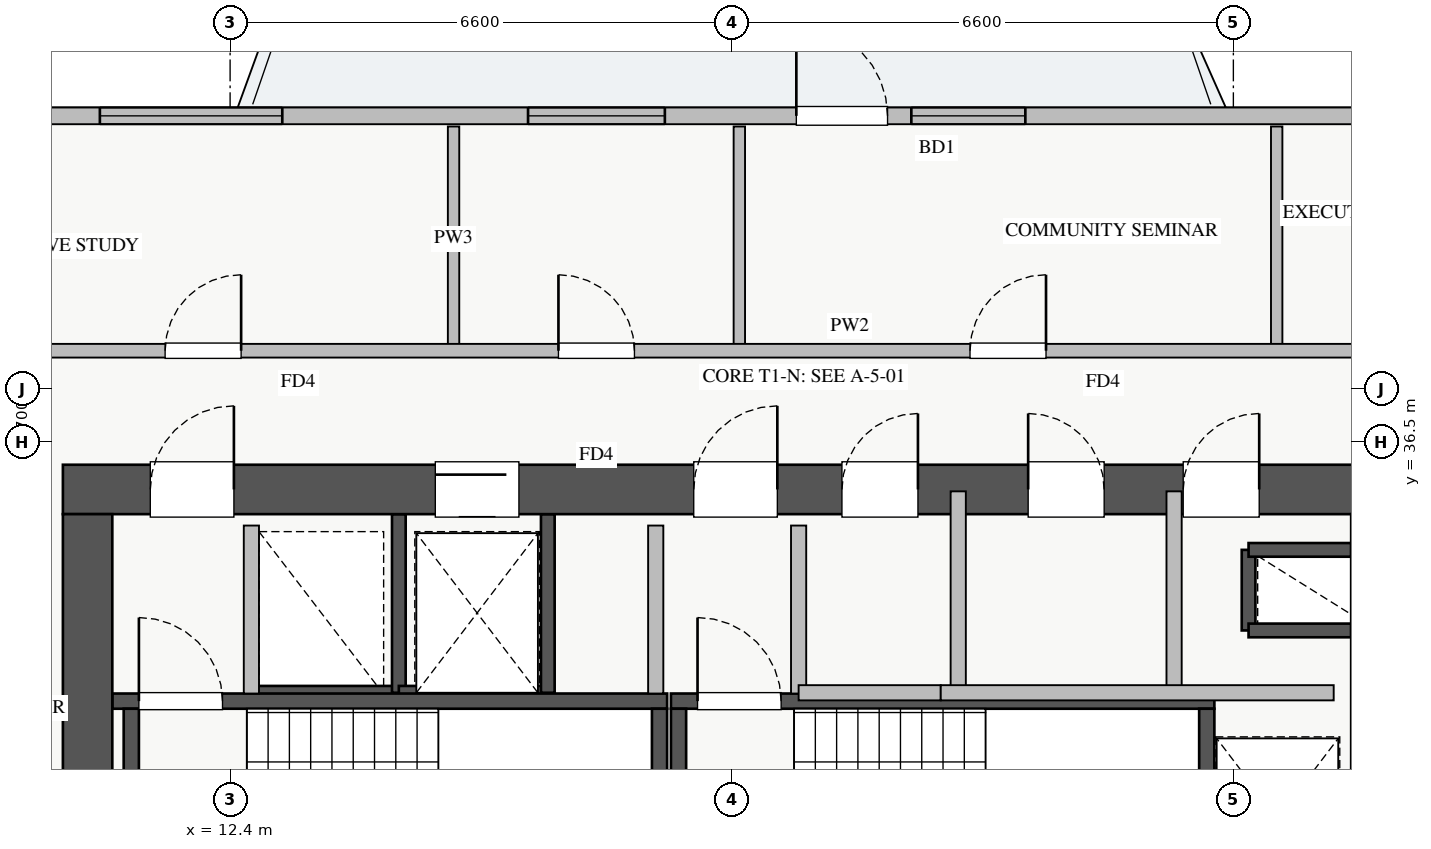
"""IFC4 building model, lengths in metres.
Left out: names, types, materials, properties, quantities, classifications, styles, units other than length and angle.
Written with IfcOpenShell. Run it as: python <this file> out.ifc"""

import sys

from ifc_helpers import new_model, si_unit, direction, frame, frame_2d, origin, place, context, subcontext, project, spatial, rectangle, extrude, source, transform, mapped, element, fill, save


model = new_model("IFC4")
c1 = context("Model", 3, precision=1e-05, world=origin(), true_north=direction((0.0, 1.0)))
c2 = subcontext(c1, "Body", "Model", "MODEL_VIEW")
j1 = project(units=[si_unit("LENGTHUNIT", "METRE"), si_unit("PLANEANGLEUNIT", "RADIAN")], contexts=[c1])
p1 = place(None, origin())
s1 = spatial("IfcSite", under=j1, at=p1, CompositionType="ELEMENT")
p2 = place(p1, origin())
s2 = spatial("IfcBuilding", under=s1, at=p2, CompositionType="ELEMENT")
p3 = place(p2, frame((0.0, 0.0, 150.25)))
s3 = spatial("IfcBuildingStorey", under=s2, at=p3, CompositionType="ELEMENT", Elevation=150.25)
p4 = place(p3, frame((12.68, 33.2, 0.0), z_axis=(0.0, 0.0, 1.0), x_axis=(1.0, 0.0, 0.0)))
e1 = element("IfcWall", 1, at=p4, inside=s3, PredefinedType="SHEAR", context=c2, shape_type="SweptSolid", body=[
    extrude(rectangle(XDim=1.94, YDim=0.18, at=frame_2d((0.97, 0.0))), origin(), (0.0, 0.0, 1.0), 3.07),
])
p5 = place(p3, frame((14.62, 33.2, 0.0), z_axis=(0.0, 0.0, 1.0), x_axis=(0.0, 1.0, 0.0)))
e2 = element("IfcWall", 2, at=p5, inside=s3, PredefinedType="SHEAR", context=c2, shape_type="SweptSolid", body=[
    extrude(rectangle(XDim=2.35, YDim=0.18, at=frame_2d((1.175, 0.0))), origin(), (0.0, 0.0, 1.0), 3.07),
])
p6 = place(p3, frame((25.8, 34.02, 0.0), z_axis=(0.0, 0.0, 1.0), x_axis=(0.0, 1.0, 0.0)))
e3 = element("IfcWall", 3, at=p6, inside=s3, PredefinedType="SHEAR", context=c2, shape_type="SweptSolid", body=[
    extrude(rectangle(XDim=1.06, YDim=0.18, at=frame_2d((0.53, 0.0))), origin(), (0.0, 0.0, 1.0), 3.07),
])
for number, where, z_axis, x_axis in (
    (4, (25.8, 35.08, 0.0), (0.0, 0.0, 1.0), (1.0, 0.0, 0.0)),
    (5, (25.8, 34.02, 0.0), (0.0, 0.0, 1.0), (1.0, 0.0, 0.0)),
):
    element("IfcWall", number, at=place(p3, frame(where, z_axis=z_axis, x_axis=x_axis)), inside=s3, PredefinedType="SHEAR", context=c2, shape_type="SweptSolid", body=[
        extrude(rectangle(XDim=1.35, YDim=0.18, at=frame_2d((0.675, 0.0))), origin(), (0.0, 0.0, 1.0), 3.07),
    ])
p7 = place(p3, frame((14.62, 33.2, 0.0), z_axis=(0.0, 0.0, 1.0), x_axis=(1.0, 0.0, 0.0)))
e6 = element("IfcWall", 6, at=p7, inside=s3, PredefinedType="SHEAR", context=c2, shape_type="SweptSolid", body=[
    extrude(rectangle(XDim=1.96, YDim=0.18, at=frame_2d((0.98, 0.0))), origin(), (0.0, 0.0, 1.0), 3.07),
])
p8 = place(p3, frame((16.58, 33.2, 0.0), z_axis=(0.0, 0.0, 1.0), x_axis=(0.0, 1.0, 0.0)))
e7 = element("IfcWall", 7, at=p8, inside=s3, PredefinedType="SHEAR", context=c2, shape_type="SweptSolid", body=[
    extrude(rectangle(XDim=2.35, YDim=0.18, at=frame_2d((1.175, 0.0))), origin(), (0.0, 0.0, 1.0), 3.07),
])
p9 = place(p3, frame((10.85, 33.09, 0.0), z_axis=(0.0, 0.0, 1.0), x_axis=(1.0, 0.0, 0.0)))
e8 = element("IfcWall", 8, at=p9, inside=s3, PredefinedType="SHEAR", context=c2, shape_type="SweptSolid", body=[
    extrude(rectangle(XDim=7.3, YDim=0.2, at=frame_2d((3.65, 0.0))), origin(), (0.0, 0.0, 1.0), 3.25),
])
p10 = place(p9, frame((0.35, 0.0, 0.0)))
e9 = element("IfcOpeningElement", 9, at=p10, cuts=e8, PredefinedType="OPENING", context=c2, shape_type="SweptSolid", body=[
    extrude(rectangle(XDim=1.1, YDim=2.05, at=frame_2d((0.55, 1.025))), frame((0.0, 0.11, 0.0), z_axis=(0.0, -1.0, 0.0), x_axis=(1.0, 0.0, 0.0)), (0.0, 0.0, 1.0), 0.22),
])
for number, where, z_axis, x_axis in (
    (10, (11.1, 30.05, 0.0), (0.0, 0.0, 1.0), (0.0, 1.0, 0.0)),
    (11, (18.05, 30.05, 0.0), (0.0, 0.0, 1.0), (0.0, 1.0, 0.0)),
):
    element("IfcWall", number, at=place(p3, frame(where, z_axis=z_axis, x_axis=x_axis)), inside=s3, PredefinedType="SHEAR", context=c2, shape_type="SweptSolid", body=[
        extrude(rectangle(XDim=2.94, YDim=0.2, at=frame_2d((1.47, 0.0))), origin(), (0.0, 0.0, 1.0), 3.25),
    ])
p11 = place(p3, frame((18.2, 33.09, 0.0), z_axis=(0.0, 0.0, 1.0), x_axis=(1.0, 0.0, 0.0)))
e12 = element("IfcWall", 12, at=p11, inside=s3, PredefinedType="SHEAR", context=c2, shape_type="SweptSolid", body=[
    extrude(rectangle(XDim=7.15, YDim=0.2, at=frame_2d((3.575, 0.0))), origin(), (0.0, 0.0, 1.0), 3.25),
])
p12 = place(p11, frame((0.35, 0.0, 0.0)))
e13 = element("IfcOpeningElement", 13, at=p12, cuts=e12, PredefinedType="OPENING", context=c2, shape_type="SweptSolid", body=[
    extrude(rectangle(XDim=1.1, YDim=2.05, at=frame_2d((0.55, 1.025))), frame((0.0, 0.11, 0.0), z_axis=(0.0, -1.0, 0.0), x_axis=(1.0, 0.0, 0.0)), (0.0, 0.0, 1.0), 0.22),
])
for number, where, z_axis, x_axis in (
    (14, (18.3, 30.05, 0.0), (0.0, 0.0, 1.0), (0.0, 1.0, 0.0)),
    (15, (25.25, 30.05, 0.0), (0.0, 0.0, 1.0), (0.0, 1.0, 0.0)),
):
    element("IfcWall", number, at=place(p3, frame(where, z_axis=z_axis, x_axis=x_axis)), inside=s3, PredefinedType="SHEAR", context=c2, shape_type="SweptSolid", body=[
        extrude(rectangle(XDim=2.94, YDim=0.2, at=frame_2d((1.47, 0.0))), origin(), (0.0, 0.0, 1.0), 3.25),
    ])
p13 = place(p3, frame((10.2, 35.875, 0.0), z_axis=(0.0, 0.0, 1.0), x_axis=(1.0, 0.0, 0.0)))
e16 = element("IfcWall", 16, at=p13, inside=s3, PredefinedType="SHEAR", context=c2, shape_type="SweptSolid", body=[
    extrude(rectangle(XDim=17.6, YDim=0.65, at=frame_2d((8.8, 0.0))), origin(), (0.0, 0.0, 1.0), 3.25),
])
p14 = place(p13, frame((1.15, 0.0, 0.0)))
e17 = element("IfcOpeningElement", 17, at=p14, cuts=e16, PredefinedType="OPENING", context=c2, shape_type="SweptSolid", body=[
    extrude(rectangle(XDim=1.1, YDim=2.05, at=frame_2d((0.55, 1.025))), frame((0.0, 0.335, 0.0), z_axis=(0.0, -1.0, 0.0), x_axis=(1.0, 0.0, 0.0)), (0.0, 0.0, 1.0), 0.67),
])
p15 = place(p13, frame((8.3, 0.0, 0.0)))
e18 = element("IfcOpeningElement", 18, at=p15, cuts=e16, PredefinedType="OPENING", context=c2, shape_type="SweptSolid", body=[
    extrude(rectangle(XDim=1.1, YDim=2.05, at=frame_2d((0.55, 1.025))), frame((0.0, 0.335, 0.0), z_axis=(0.0, -1.0, 0.0), x_axis=(1.0, 0.0, 0.0)), (0.0, 0.0, 1.0), 0.67),
])
p16 = place(p13, frame((4.9, 0.0, 0.0)))
e19 = element("IfcOpeningElement", 19, at=p16, cuts=e16, PredefinedType="OPENING", context=c2, shape_type="SweptSolid", body=[
    extrude(rectangle(XDim=1.1, YDim=2.05, at=frame_2d((0.55, 1.025))), frame((0.0, 0.335, 0.0), z_axis=(0.0, -1.0, 0.0), x_axis=(1.0, 0.0, 0.0)), (0.0, 0.0, 1.0), 0.67),
])
p17 = place(p13, frame((14.74, 0.0, 0.0)))
e20 = element("IfcOpeningElement", 20, at=p17, cuts=e16, PredefinedType="OPENING", context=c2, shape_type="SweptSolid", body=[
    extrude(rectangle(XDim=1.0, YDim=2.05, at=frame_2d((0.5, 1.025))), frame((0.0, 0.335, 0.0), z_axis=(0.0, -1.0, 0.0), x_axis=(1.0, 0.0, 0.0)), (0.0, 0.0, 1.0), 0.67),
])
p18 = place(p13, frame((10.25, 0.0, 0.0)))
e21 = element("IfcOpeningElement", 21, at=p18, cuts=e16, PredefinedType="OPENING", context=c2, shape_type="SweptSolid", body=[
    extrude(rectangle(XDim=1.0, YDim=2.05, at=frame_2d((0.5, 1.025))), frame((0.0, 0.335, 0.0), z_axis=(0.0, -1.0, 0.0), x_axis=(1.0, 0.0, 0.0)), (0.0, 0.0, 1.0), 0.67),
])
p19 = place(p13, frame((12.7, 0.0, 0.0)))
e22 = element("IfcOpeningElement", 22, at=p19, cuts=e16, PredefinedType="OPENING", context=c2, shape_type="SweptSolid", body=[
    extrude(rectangle(XDim=1.0, YDim=2.05, at=frame_2d((0.5, 1.025))), frame((0.0, 0.335, 0.0), z_axis=(0.0, -1.0, 0.0), x_axis=(1.0, 0.0, 0.0)), (0.0, 0.0, 1.0), 0.67),
])
p20 = place(p3, frame((10.525, 29.65, 0.0), z_axis=(0.0, 0.0, 1.0), x_axis=(0.0, 1.0, 0.0)))
e23 = element("IfcWall", 23, at=p20, inside=s3, PredefinedType="SHEAR", context=c2, shape_type="SweptSolid", body=[
    extrude(rectangle(XDim=5.9, YDim=0.65, at=frame_2d((2.95, 0.0))), origin(), (0.0, 0.0, 1.0), 3.25),
])
p21 = place(p3, frame((6.55, 40.79, 0.0), z_axis=(0.0, 0.0, 1.0), x_axis=(1.0, 0.0, 0.0)))
e24 = element("IfcWall", 24, at=p21, inside=s3, PredefinedType="STANDARD", context=c2, shape_type="SweptSolid", body=[
    extrude(rectangle(XDim=24.9, YDim=0.22, at=frame_2d((12.45, 0.0))), origin(), (0.0, 0.0, 1.0), 2.61),
])
p22 = place(p21, frame((13.3, 0.0, 0.0)))
e25 = element("IfcOpeningElement", 25, at=p22, cuts=e24, PredefinedType="OPENING", context=c2, shape_type="SweptSolid", body=[
    extrude(rectangle(XDim=1.2, YDim=2.1, at=frame_2d((0.6, 1.05))), frame((0.0, 0.12, 0.0), z_axis=(0.0, -1.0, 0.0), x_axis=(1.0, 0.0, 0.0)), (0.0, 0.0, 1.0), 0.24),
])
p23 = place(p21, frame((0.357, 0.0, 0.9)))
e26 = element("IfcOpeningElement", 26, at=p23, cuts=e24, PredefinedType="OPENING", context=c2, shape_type="SweptSolid", body=[
    extrude(rectangle(XDim=1.5, YDim=1.5, at=frame_2d((0.75, 0.75))), frame((0.0, 0.12, 0.0), z_axis=(0.0, -1.0, 0.0), x_axis=(1.0, 0.0, 0.0)), (0.0, 0.0, 1.0), 0.24),
])
p24 = place(p21, frame((9.77, 0.0, 0.9)))
e27 = element("IfcOpeningElement", 27, at=p24, cuts=e24, PredefinedType="OPENING", context=c2, shape_type="SweptSolid", body=[
    extrude(rectangle(XDim=1.8, YDim=1.5, at=frame_2d((0.9, 0.75))), frame((0.0, 0.12, 0.0), z_axis=(0.0, -1.0, 0.0), x_axis=(1.0, 0.0, 0.0)), (0.0, 0.0, 1.0), 0.24),
])
p25 = place(p21, frame((14.813, 0.0, 0.9)))
e28 = element("IfcOpeningElement", 28, at=p25, cuts=e24, PredefinedType="OPENING", context=c2, shape_type="SweptSolid", body=[
    extrude(rectangle(XDim=1.5, YDim=1.45, at=frame_2d((0.75, 0.725))), frame((0.0, 0.12, 0.0), z_axis=(0.0, -1.0, 0.0), x_axis=(1.0, 0.0, 0.0)), (0.0, 0.0, 1.0), 0.24),
])
p26 = place(p21, frame((20.738, 0.0, 0.9)))
e29 = element("IfcOpeningElement", 29, at=p26, cuts=e24, PredefinedType="OPENING", context=c2, shape_type="SweptSolid", body=[
    extrude(rectangle(XDim=2.1, YDim=1.48, at=frame_2d((1.05, 0.74))), frame((0.0, 0.12, 0.0), z_axis=(0.0, -1.0, 0.0), x_axis=(1.0, 0.0, 0.0)), (0.0, 0.0, 1.0), 0.24),
])
p27 = place(p21, frame((4.136, 0.0, 0.9)))
e30 = element("IfcOpeningElement", 30, at=p27, cuts=e24, PredefinedType="OPENING", context=c2, shape_type="SweptSolid", body=[
    extrude(rectangle(XDim=2.4, YDim=1.5, at=frame_2d((1.2, 0.75))), frame((0.0, 0.12, 0.0), z_axis=(0.0, -1.0, 0.0), x_axis=(1.0, 0.0, 0.0)), (0.0, 0.0, 1.0), 0.24),
])
for number, where, z_axis, x_axis in (
    (31, (12.68, 33.19, 0.0), (0.0, 0.0, 1.0), (0.0, 1.0, 0.0)),
    (32, (18.0, 33.19, 0.0), (0.0, 0.0, 1.0), (0.0, 1.0, 0.0)),
    (33, (19.88, 33.19, 0.0), (0.0, 0.0, 1.0), (0.0, 1.0, 0.0)),
):
    element("IfcWall", number, at=place(p3, frame(where, z_axis=z_axis, x_axis=x_axis)), inside=s3, PredefinedType="PARTITIONING", context=c2, shape_type="SweptSolid", body=[
        extrude(rectangle(XDim=2.21, YDim=0.2, at=frame_2d((1.105, 0.0))), origin(), (0.0, 0.0, 1.0), 3.07),
    ])
p28 = place(p3, frame((24.82, 33.2, 0.0), z_axis=(0.0, 0.0, 1.0), x_axis=(0.0, 1.0, 0.0)))
e34 = element("IfcWall", 34, at=p28, inside=s3, PredefinedType="PARTITIONING", context=c2, shape_type="SweptSolid", body=[
    extrude(rectangle(XDim=2.65, YDim=0.2, at=frame_2d((1.325, 0.0))), origin(), (0.0, 0.0, 1.0), 3.07),
])
p29 = place(p3, frame((19.88, 33.2, 0.0), z_axis=(0.0, 0.0, 1.0), x_axis=(1.0, 0.0, 0.0)))
e35 = element("IfcWall", 35, at=p29, inside=s3, PredefinedType="PARTITIONING", context=c2, shape_type="SweptSolid", body=[
    extrude(rectangle(XDim=1.87, YDim=0.2, at=frame_2d((0.935, 0.0))), origin(), (0.0, 0.0, 1.0), 3.07),
])
p30 = place(p3, frame((21.98, 33.2, 0.0), z_axis=(0.0, 0.0, 1.0), x_axis=(0.0, 1.0, 0.0)))
e36 = element("IfcWall", 36, at=p30, inside=s3, PredefinedType="PARTITIONING", context=c2, shape_type="SweptSolid", body=[
    extrude(rectangle(XDim=2.65, YDim=0.2, at=frame_2d((1.325, 0.0))), origin(), (0.0, 0.0, 1.0), 3.07),
])
p31 = place(p3, frame((21.75, 33.2, 0.0), z_axis=(0.0, 0.0, 1.0), x_axis=(1.0, 0.0, 0.0)))
e37 = element("IfcWall", 37, at=p31, inside=s3, PredefinedType="PARTITIONING", context=c2, shape_type="SweptSolid", body=[
    extrude(rectangle(XDim=5.17, YDim=0.2, at=frame_2d((2.585, 0.0))), origin(), (0.0, 0.0, 1.0), 3.07),
])
p32 = place(p3, frame((15.34, 37.7, 0.0), z_axis=(0.0, 0.0, 1.0), x_axis=(0.0, 1.0, 0.0)))
e38 = element("IfcWall", 38, at=p32, inside=s3, PredefinedType="PARTITIONING", context=c2, shape_type="SweptSolid", body=[
    extrude(rectangle(XDim=2.95, YDim=0.15, at=frame_2d((1.475, 0.0))), origin(), (0.0, 0.0, 1.0), 3.07),
])
p33 = place(p3, frame((19.1, 37.7, 0.0), z_axis=(0.0, 0.0, 1.0), x_axis=(0.0, 1.0, 0.0)))
e39 = element("IfcWall", 39, at=p33, inside=s3, PredefinedType="PARTITIONING", context=c2, shape_type="SweptSolid", body=[
    extrude(rectangle(XDim=2.95, YDim=0.15, at=frame_2d((1.475, 0.0))), origin(), (0.0, 0.0, 1.0), 2.765),
])
p34 = place(p3, frame((26.17, 37.7, 0.0), z_axis=(0.0, 0.0, 1.0), x_axis=(0.0, 1.0, 0.0)))
e40 = element("IfcWall", 40, at=p34, inside=s3, PredefinedType="PARTITIONING", context=c2, shape_type="SweptSolid", body=[
    extrude(rectangle(XDim=2.95, YDim=0.15, at=frame_2d((1.475, 0.0))), origin(), (0.0, 0.0, 1.0), 3.07),
])
p35 = place(p3, frame((8.75, 37.7, 0.0), z_axis=(0.0, 0.0, 1.0), x_axis=(1.0, 0.0, 0.0)))
e41 = element("IfcWall", 41, at=p35, inside=s3, PredefinedType="PARTITIONING", context=c2, shape_type="SweptSolid", body=[
    extrude(rectangle(XDim=23.61, YDim=0.18, at=frame_2d((11.805, 0.0))), origin(), (0.0, 0.0, 1.0), 3.07),
])
p36 = place(p35, frame((2.795, 0.0, 0.0)))
e42 = element("IfcOpeningElement", 42, at=p36, cuts=e41, PredefinedType="OPENING", context=c2, shape_type="SweptSolid", body=[
    extrude(rectangle(XDim=1.0, YDim=2.05, at=frame_2d((0.5, 1.025))), frame((0.0, 0.1, 0.0), z_axis=(0.0, -1.0, 0.0), x_axis=(1.0, 0.0, 0.0)), (0.0, 0.0, 1.0), 0.2),
])
p37 = place(p35, frame((7.97, 0.0, 0.0)))
e43 = element("IfcOpeningElement", 43, at=p37, cuts=e41, PredefinedType="OPENING", context=c2, shape_type="SweptSolid", body=[
    extrude(rectangle(XDim=1.0, YDim=2.05, at=frame_2d((0.5, 1.025))), frame((0.0, 0.1, 0.0), z_axis=(0.0, -1.0, 0.0), x_axis=(1.0, 0.0, 0.0)), (0.0, 0.0, 1.0), 0.2),
])
p38 = place(p35, frame((13.385, 0.0, 0.0)))
e44 = element("IfcOpeningElement", 44, at=p38, cuts=e41, PredefinedType="OPENING", context=c2, shape_type="SweptSolid", body=[
    extrude(rectangle(XDim=1.0, YDim=2.05, at=frame_2d((0.5, 1.025))), frame((0.0, 0.1, 0.0), z_axis=(0.0, -1.0, 0.0), x_axis=(1.0, 0.0, 0.0)), (0.0, 0.0, 1.0), 0.2),
])
p39 = place(p35, frame((19.825, 0.0, 0.0)))
e45 = element("IfcOpeningElement", 45, at=p39, cuts=e41, PredefinedType="OPENING", context=c2, shape_type="SweptSolid", body=[
    extrude(rectangle(XDim=1.0, YDim=2.05, at=frame_2d((0.5, 1.025))), frame((0.0, 0.1, 0.0), z_axis=(0.0, -1.0, 0.0), x_axis=(1.0, 0.0, 0.0)), (0.0, 0.0, 1.0), 0.2),
])
m1 = source(origin(), c2, "Body", "SweptSolid", [
    extrude(rectangle(XDim=1.2, YDim=2.1, at=frame_2d((0.6, 1.05))), frame((0.0, 0.025, 0.0), z_axis=(0.0, -1.0, 0.0), x_axis=(1.0, 0.0, 0.0)), (0.0, 0.0, 1.0), 0.05),
])
p40 = place(p22, origin())
e46 = element("IfcDoor", 46, at=p40, inside=s3, OperationType="SINGLE_SWING_LEFT", PredefinedType="DOOR", context=c2, shape_type="MappedRepresentation", body=[
    mapped(m1, transform((0.0, 0.0, 0.0), x_axis=(1.0, 0.0, 0.0), y_axis=(0.0, 1.0, 0.0), z_axis=(0.0, 0.0, 1.0), scale=1.0)),
])
fill(e25, e46)
m2 = source(origin(), c2, "Body", "SweptSolid", [
    extrude(rectangle(XDim=1.8, YDim=1.5, at=frame_2d((0.9, 0.75))), frame((0.0, 0.03, 0.0), z_axis=(0.0, -1.0, 0.0), x_axis=(1.0, 0.0, 0.0)), (0.0, 0.0, 1.0), 0.06),
])
p41 = place(p24, origin())
e47 = element("IfcWindow", 47, at=p41, inside=s3, PartitioningType="DOUBLE_PANEL_VERTICAL", PredefinedType="WINDOW", context=c2, shape_type="MappedRepresentation", body=[
    mapped(m2, transform((0.0, 0.0, 0.0), x_axis=(1.0, 0.0, 0.0), y_axis=(0.0, 1.0, 0.0), z_axis=(0.0, 0.0, 1.0), scale=1.0)),
])
fill(e27, e47)
m3 = source(origin(), c2, "Body", "SweptSolid", [
    extrude(rectangle(XDim=1.5, YDim=1.45, at=frame_2d((0.75, 0.725))), frame((0.0, 0.03, 0.0), z_axis=(0.0, -1.0, 0.0), x_axis=(1.0, 0.0, 0.0)), (0.0, 0.0, 1.0), 0.06),
])
p42 = place(p25, origin())
e48 = element("IfcWindow", 48, at=p42, inside=s3, PartitioningType="DOUBLE_PANEL_VERTICAL", PredefinedType="WINDOW", context=c2, shape_type="MappedRepresentation", body=[
    mapped(m3, transform((0.0, 0.0, 0.0), x_axis=(1.0, 0.0, 0.0), y_axis=(0.0, 1.0, 0.0), z_axis=(0.0, 0.0, 1.0), scale=1.0)),
])
fill(e28, e48)
m4 = source(origin(), c2, "Body", "SweptSolid", [
    extrude(rectangle(XDim=1.1, YDim=2.05, at=frame_2d((0.55, 1.025))), frame((0.0, 0.025, 0.0), z_axis=(0.0, -1.0, 0.0), x_axis=(1.0, 0.0, 0.0)), (0.0, 0.0, 1.0), 0.05),
])
p43 = place(p14, origin())
e49 = element("IfcDoor", 49, at=p43, inside=s3, OperationType="SINGLE_SWING_RIGHT", PredefinedType="DOOR", context=c2, shape_type="MappedRepresentation", body=[
    mapped(m4, transform((0.0, 0.0, 0.0), x_axis=(1.0, 0.0, 0.0), y_axis=(0.0, 1.0, 0.0), z_axis=(0.0, 0.0, 1.0), scale=1.0)),
])
fill(e17, e49)
p44 = place(p10, origin())
e50 = element("IfcDoor", 50, at=p44, inside=s3, OperationType="SINGLE_SWING_LEFT", PredefinedType="DOOR", context=c2, shape_type="MappedRepresentation", body=[
    mapped(m4, transform((0.0, 0.0, 0.0), x_axis=(1.0, 0.0, 0.0), y_axis=(0.0, 1.0, 0.0), z_axis=(0.0, 0.0, 1.0), scale=1.0)),
])
fill(e9, e50)
p45 = place(p15, origin())
e51 = element("IfcDoor", 51, at=p45, inside=s3, OperationType="SINGLE_SWING_RIGHT", PredefinedType="DOOR", context=c2, shape_type="MappedRepresentation", body=[
    mapped(m4, transform((0.0, 0.0, 0.0), x_axis=(1.0, 0.0, 0.0), y_axis=(0.0, 1.0, 0.0), z_axis=(0.0, 0.0, 1.0), scale=1.0)),
])
fill(e18, e51)
p46 = place(p12, origin())
e52 = element("IfcDoor", 52, at=p46, inside=s3, OperationType="SINGLE_SWING_LEFT", PredefinedType="DOOR", context=c2, shape_type="MappedRepresentation", body=[
    mapped(m4, transform((0.0, 0.0, 0.0), x_axis=(1.0, 0.0, 0.0), y_axis=(0.0, 1.0, 0.0), z_axis=(0.0, 0.0, 1.0), scale=1.0)),
])
fill(e13, e52)
p47 = place(p16, origin())
e53 = element("IfcDoor", 53, at=p47, inside=s3, OperationType="SLIDING_TO_LEFT", PredefinedType="DOOR", context=c2, shape_type="MappedRepresentation", body=[
    mapped(m4, transform((0.0, 0.0, 0.0), x_axis=(1.0, 0.0, 0.0), y_axis=(0.0, 1.0, 0.0), z_axis=(0.0, 0.0, 1.0), scale=1.0)),
])
fill(e19, e53)
m5 = source(origin(), c2, "Body", "SweptSolid", [
    extrude(rectangle(XDim=1.0, YDim=2.05, at=frame_2d((0.5, 1.025))), frame((0.0, 0.025, 0.0), z_axis=(0.0, -1.0, 0.0), x_axis=(1.0, 0.0, 0.0)), (0.0, 0.0, 1.0), 0.05),
])
p48 = place(p17, origin())
e54 = element("IfcDoor", 54, at=p48, inside=s3, OperationType="SINGLE_SWING_RIGHT", PredefinedType="DOOR", context=c2, shape_type="MappedRepresentation", body=[
    mapped(m5, transform((0.0, 0.0, 0.0), x_axis=(1.0, 0.0, 0.0), y_axis=(0.0, 1.0, 0.0), z_axis=(0.0, 0.0, 1.0), scale=1.0)),
])
fill(e20, e54)
p49 = place(p18, origin())
e55 = element("IfcDoor", 55, at=p49, inside=s3, OperationType="SINGLE_SWING_RIGHT", PredefinedType="DOOR", context=c2, shape_type="MappedRepresentation", body=[
    mapped(m5, transform((0.0, 0.0, 0.0), x_axis=(1.0, 0.0, 0.0), y_axis=(0.0, 1.0, 0.0), z_axis=(0.0, 0.0, 1.0), scale=1.0)),
])
fill(e21, e55)
p50 = place(p19, origin())
e56 = element("IfcDoor", 56, at=p50, inside=s3, OperationType="SINGLE_SWING_LEFT", PredefinedType="DOOR", context=c2, shape_type="MappedRepresentation", body=[
    mapped(m5, transform((0.0, 0.0, 0.0), x_axis=(1.0, 0.0, 0.0), y_axis=(0.0, 1.0, 0.0), z_axis=(0.0, 0.0, 1.0), scale=1.0)),
])
fill(e22, e56)
p51 = place(p36, origin())
e57 = element("IfcDoor", 57, at=p51, inside=s3, OperationType="SINGLE_SWING_RIGHT", PredefinedType="DOOR", context=c2, shape_type="MappedRepresentation", body=[
    mapped(m5, transform((0.0, 0.0, 0.0), x_axis=(1.0, 0.0, 0.0), y_axis=(0.0, 1.0, 0.0), z_axis=(0.0, 0.0, 1.0), scale=1.0)),
])
fill(e42, e57)
p52 = place(p37, origin())
e58 = element("IfcDoor", 58, at=p52, inside=s3, OperationType="SINGLE_SWING_LEFT", PredefinedType="DOOR", context=c2, shape_type="MappedRepresentation", body=[
    mapped(m5, transform((0.0, 0.0, 0.0), x_axis=(1.0, 0.0, 0.0), y_axis=(0.0, 1.0, 0.0), z_axis=(0.0, 0.0, 1.0), scale=1.0)),
])
fill(e43, e58)
p53 = place(p38, origin())
e59 = element("IfcDoor", 59, at=p53, inside=s3, OperationType="SINGLE_SWING_RIGHT", PredefinedType="DOOR", context=c2, shape_type="MappedRepresentation", body=[
    mapped(m5, transform((0.0, 0.0, 0.0), x_axis=(1.0, 0.0, 0.0), y_axis=(0.0, 1.0, 0.0), z_axis=(0.0, 0.0, 1.0), scale=1.0)),
])
fill(e44, e59)
m6 = source(origin(), c2, "Body", "SweptSolid", [
    extrude(rectangle(XDim=2.4, YDim=1.5, at=frame_2d((1.2, 0.75))), frame((0.0, 0.03, 0.0), z_axis=(0.0, -1.0, 0.0), x_axis=(1.0, 0.0, 0.0)), (0.0, 0.0, 1.0), 0.06),
])
p54 = place(p27, origin())
e60 = element("IfcWindow", 60, at=p54, inside=s3, PartitioningType="TRIPLE_PANEL_VERTICAL", PredefinedType="WINDOW", context=c2, shape_type="MappedRepresentation", body=[
    mapped(m6, transform((0.0, 0.0, 0.0), x_axis=(1.0, 0.0, 0.0), y_axis=(0.0, 1.0, 0.0), z_axis=(0.0, 0.0, 1.0), scale=1.0)),
])
fill(e30, e60)
save(model, sys.argv[1])
